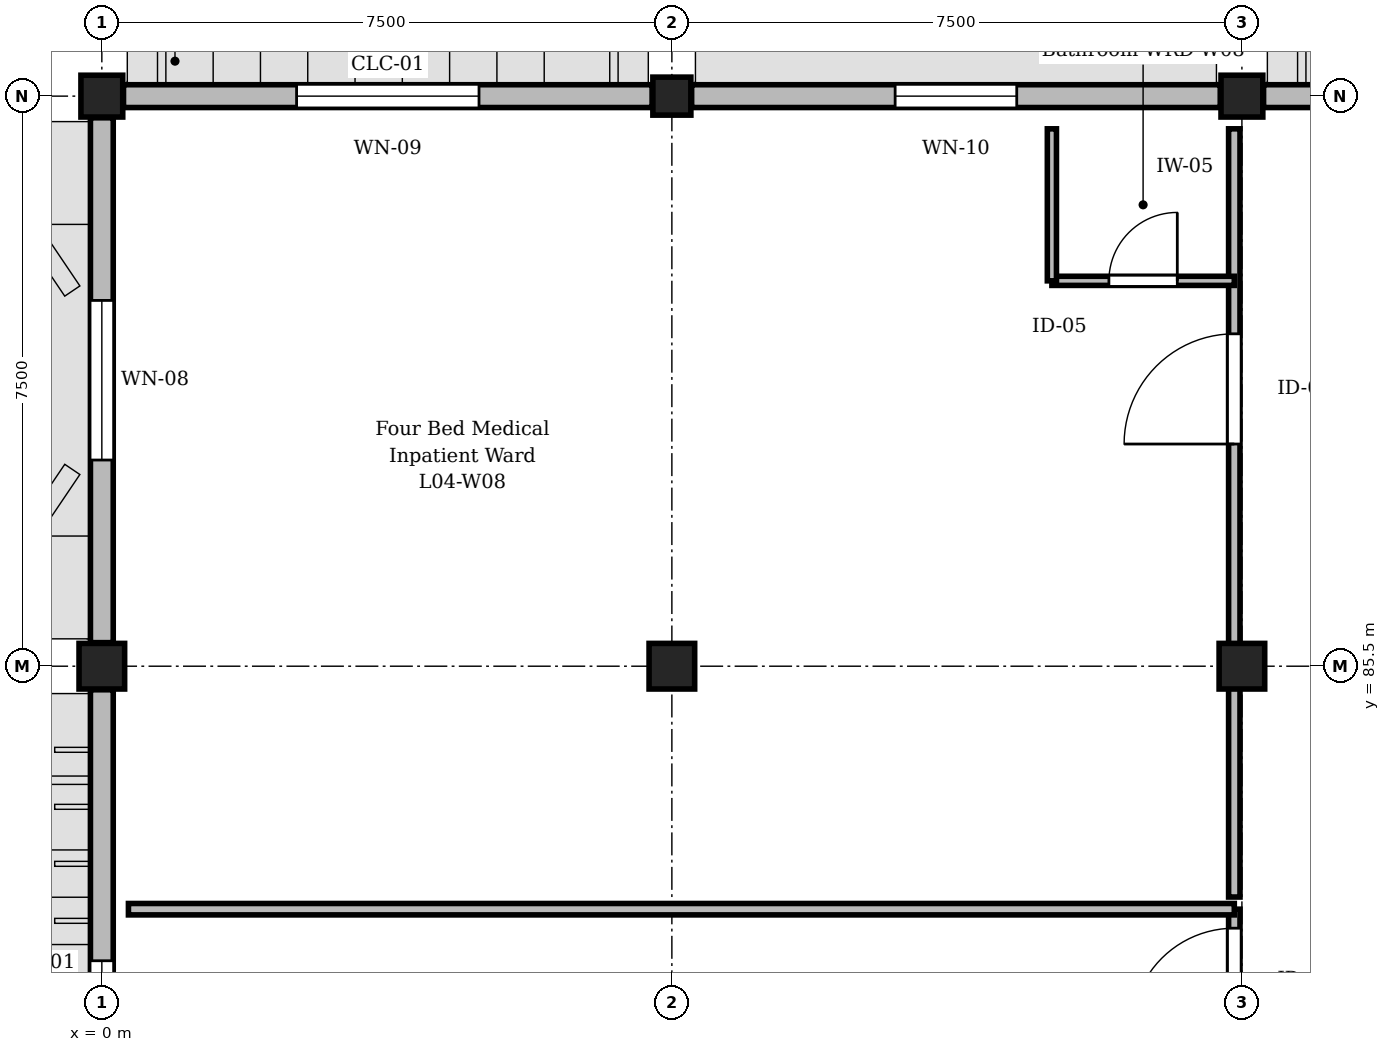
"""IFC4 building model, lengths in metres.
Left out: names, types, materials, properties, quantities, classifications, styles, units other than length and angle.
Written with IfcOpenShell. Run it as: python <this file> out.ifc"""

import sys

from ifc_helpers import new_model, si_unit, direction, frame, frame_2d, origin, origin_2d, place, context, subcontext, project, spatial, rectangle, circle, extrude, element, fill, save


model = new_model("IFC4")
c1 = context("Model", 3, precision=1e-05, world=origin(), true_north=direction((0.0, 1.0)))
c2 = subcontext(c1, "Body", "Model", "MODEL_VIEW")
j1 = project(units=[si_unit("LENGTHUNIT", "METRE"), si_unit("PLANEANGLEUNIT", "RADIAN")], contexts=[c1])
p1 = place(None, origin())
s1 = spatial("IfcSite", under=j1, at=p1, CompositionType="ELEMENT")
p2 = place(p1, origin())
s2 = spatial("IfcBuilding", under=s1, at=p2, CompositionType="ELEMENT")
p3 = place(p2, frame((0.0, 0.0, 17.85)))
s3 = spatial("IfcBuildingStorey", under=s2, at=p3, CompositionType="ELEMENT", Elevation=17.85)
p4 = place(p3, frame((0.0, 85.5, 0.0), z_axis=(0.0, 0.0, 1.0), x_axis=(1.0, 0.0, 0.0)))
e1 = element("IfcColumn", 1, at=p4, inside=s3, PredefinedType="COLUMN", context=c2, shape_type="SweptSolid", body=[
    extrude(rectangle(XDim=0.6, YDim=0.6, at=origin_2d()), origin(), (0.0, 0.0, 1.0), 4.05),
])
p5 = place(p3, frame((0.0, 93.0, 0.0), z_axis=(0.0, 0.0, 1.0), x_axis=(1.0, 0.0, 0.0)))
e2 = element("IfcColumn", 2, at=p5, inside=s3, PredefinedType="COLUMN", context=c2, shape_type="SweptSolid", body=[
    extrude(rectangle(XDim=0.55, YDim=0.55, at=origin_2d()), origin(), (0.0, 0.0, 1.0), 4.05),
])
p6 = place(p3, frame((7.5, 85.5, 0.0), z_axis=(0.0, 0.0, 1.0), x_axis=(1.0, 0.0, 0.0)))
e3 = element("IfcColumn", 3, at=p6, inside=s3, PredefinedType="COLUMN", context=c2, shape_type="SweptSolid", body=[
    extrude(circle(Radius=0.3, at=origin_2d()), origin(), (0.0, 0.0, 1.0), 4.05),
])
p7 = place(p3, frame((7.5, 93.0, 0.0), z_axis=(0.0, 0.0, 1.0), x_axis=(1.0, 0.0, 0.0)))
e4 = element("IfcColumn", 4, at=p7, inside=s3, PredefinedType="COLUMN", context=c2, shape_type="SweptSolid", body=[
    extrude(rectangle(XDim=0.5, YDim=0.5, at=origin_2d()), origin(), (0.0, 0.0, 1.0), 4.05),
])
p8 = place(p3, frame((15.0, 85.5, 0.0), z_axis=(0.0, 0.0, 1.0), x_axis=(1.0, 0.0, 0.0)))
e5 = element("IfcColumn", 5, at=p8, inside=s3, PredefinedType="COLUMN", context=c2, shape_type="SweptSolid", body=[
    extrude(rectangle(XDim=0.6, YDim=0.6, at=origin_2d()), origin(), (0.0, 0.0, 1.0), 4.05),
])
p9 = place(p3, frame((15.0, 93.0, 0.0), z_axis=(0.0, 0.0, 1.0), x_axis=(1.0, 0.0, 0.0)))
e6 = element("IfcColumn", 6, at=p9, inside=s3, PredefinedType="COLUMN", context=c2, shape_type="SweptSolid", body=[
    extrude(rectangle(XDim=0.55, YDim=0.55, at=origin_2d()), origin(), (0.0, 0.0, 1.0), 4.05),
])
p10 = place(p3, frame((0.0, 76.86, 0.0), z_axis=(0.0, 0.0, 1.0), x_axis=(0.0, 1.0, 0.0)))
e7 = element("IfcWall", 7, at=p10, inside=s3, PredefinedType="STANDARD", context=c2, shape_type="SweptSolid", body=[
    extrude(rectangle(XDim=8.33, YDim=0.3, at=frame_2d((4.165, 0.0))), origin(), (0.0, 0.0, 1.0), 3.22),
])
p11 = place(p10, frame((3.565, 0.0, 0.9)))
e8 = element("IfcOpeningElement", 8, at=p11, cuts=e7, PredefinedType="OPENING", context=c2, shape_type="SweptSolid", body=[
    extrude(rectangle(XDim=1.2, YDim=2.04, at=frame_2d((0.6, 1.02))), frame((0.0, 0.16, 0.0), z_axis=(0.0, -1.0, 0.0), x_axis=(1.0, 0.0, 0.0)), (0.0, 0.0, 1.0), 0.32),
])
p12 = place(p3, frame((0.285, 93.0, 0.0), z_axis=(0.0, 0.0, 1.0), x_axis=(1.0, 0.0, 0.0)))
e9 = element("IfcWall", 9, at=p12, inside=s3, PredefinedType="STANDARD", context=c2, shape_type="SweptSolid", body=[
    extrude(rectangle(XDim=6.955, YDim=0.3, at=frame_2d((3.478, 0.0))), origin(), (0.0, 0.0, 1.0), 3.17),
])
p13 = place(p12, frame((2.278, 0.0, 0.9)))
e10 = element("IfcOpeningElement", 10, at=p13, cuts=e9, PredefinedType="OPENING", context=c2, shape_type="SweptSolid", body=[
    extrude(rectangle(XDim=2.4, YDim=1.99, at=frame_2d((1.2, 0.995))), frame((0.0, 0.16, 0.0), z_axis=(0.0, -1.0, 0.0), x_axis=(1.0, 0.0, 0.0)), (0.0, 0.0, 1.0), 0.32),
])
p14 = place(p3, frame((0.0, 85.81, 0.0), z_axis=(0.0, 0.0, 1.0), x_axis=(0.0, 1.0, 0.0)))
e11 = element("IfcWall", 11, at=p14, inside=s3, PredefinedType="STANDARD", context=c2, shape_type="SweptSolid", body=[
    extrude(rectangle(XDim=6.905, YDim=0.3, at=frame_2d((3.453, 0.0))), origin(), (0.0, 0.0, 1.0), 3.17),
])
p15 = place(p14, frame((2.403, 0.0, 0.9)))
e12 = element("IfcOpeningElement", 12, at=p15, cuts=e11, PredefinedType="OPENING", context=c2, shape_type="SweptSolid", body=[
    extrude(rectangle(XDim=2.1, YDim=1.99, at=frame_2d((1.05, 0.995))), frame((0.0, 0.16, 0.0), z_axis=(0.0, -1.0, 0.0), x_axis=(1.0, 0.0, 0.0)), (0.0, 0.0, 1.0), 0.32),
])
p16 = place(p3, frame((7.76, 93.0, 0.0), z_axis=(0.0, 0.0, 1.0), x_axis=(1.0, 0.0, 0.0)))
e13 = element("IfcWall", 13, at=p16, inside=s3, PredefinedType="STANDARD", context=c2, shape_type="SweptSolid", body=[
    extrude(rectangle(XDim=6.955, YDim=0.3, at=frame_2d((3.478, 0.0))), origin(), (0.0, 0.0, 1.0), 3.17),
])
p17 = place(p16, frame((2.677, 0.0, 0.9)))
e14 = element("IfcOpeningElement", 14, at=p17, cuts=e13, PredefinedType="OPENING", context=c2, shape_type="SweptSolid", body=[
    extrude(rectangle(XDim=1.6, YDim=1.95, at=frame_2d((0.8, 0.975))), frame((0.0, 0.16, 0.0), z_axis=(0.0, -1.0, 0.0), x_axis=(1.0, 0.0, 0.0)), (0.0, 0.0, 1.0), 0.32),
])
p18 = place(p3, frame((15.285, 93.0, 0.0), z_axis=(0.0, 0.0, 1.0), x_axis=(1.0, 0.0, 0.0)))
e15 = element("IfcWall", 15, at=p18, inside=s3, PredefinedType="STANDARD", context=c2, shape_type="SweptSolid", body=[
    extrude(rectangle(XDim=6.955, YDim=0.3, at=frame_2d((3.478, 0.0))), origin(), (0.0, 0.0, 1.0), 3.17),
])
p19 = place(p18, frame((2.577, 0.0, 0.9)))
e16 = element("IfcOpeningElement", 16, at=p19, cuts=e15, PredefinedType="OPENING", context=c2, shape_type="SweptSolid", body=[
    extrude(rectangle(XDim=1.8, YDim=1.95, at=frame_2d((0.9, 0.975))), frame((0.0, 0.16, 0.0), z_axis=(0.0, -1.0, 0.0), x_axis=(1.0, 0.0, 0.0)), (0.0, 0.0, 1.0), 0.32),
])
p20 = place(p3, frame((14.9, 72.197, 0.0), z_axis=(0.0, 0.0, 1.0), x_axis=(0.0, 1.0, 0.0)))
e17 = element("IfcWall", 17, at=p20, inside=s3, PredefinedType="PARTITIONING", context=c2, shape_type="SweptSolid", body=[
    extrude(rectangle(XDim=10.106, YDim=0.15, at=frame_2d((5.053, 0.0))), origin(), (0.0, 0.0, 1.0), 3.055),
])
p21 = place(p20, frame((8.507, 0.0, 0.0)))
e18 = element("IfcOpeningElement", 18, at=p21, cuts=e17, PredefinedType="OPENING", context=c2, shape_type="SweptSolid", body=[
    extrude(rectangle(XDim=1.35, YDim=2.25, at=frame_2d((0.675, 1.125))), frame((0.0, 0.085, 0.0), z_axis=(0.0, -1.0, 0.0), x_axis=(1.0, 0.0, 0.0)), (0.0, 0.0, 1.0), 0.17),
])
p22 = place(p3, frame((14.9, 82.463, 0.0), z_axis=(0.0, 0.0, 1.0), x_axis=(0.0, 1.0, 0.0)))
e19 = element("IfcWall", 19, at=p22, inside=s3, PredefinedType="PARTITIONING", context=c2, shape_type="SweptSolid", body=[
    extrude(rectangle(XDim=10.107, YDim=0.15, at=frame_2d((5.053, 0.0))), origin(), (0.0, 0.0, 1.0), 3.055),
])
p23 = place(p22, frame((5.96, 0.0, 0.0)))
e20 = element("IfcOpeningElement", 20, at=p23, cuts=e19, PredefinedType="OPENING", context=c2, shape_type="SweptSolid", body=[
    extrude(rectangle(XDim=1.45, YDim=2.3, at=frame_2d((0.725, 1.15))), frame((0.0, 0.085, 0.0), z_axis=(0.0, -1.0, 0.0), x_axis=(1.0, 0.0, 0.0)), (0.0, 0.0, 1.0), 0.17),
])
p24 = place(p3, frame((12.5, 90.57, 0.0), z_axis=(0.0, 0.0, 1.0), x_axis=(1.0, 0.0, 0.0)))
e21 = element("IfcWall", 21, at=p24, inside=s3, PredefinedType="PARTITIONING", context=c2, shape_type="SweptSolid", body=[
    extrude(rectangle(XDim=2.4, YDim=0.12, at=frame_2d((1.2, 0.0))), origin(), (0.0, 0.0, 1.0), 3.755),
])
p25 = place(p24, frame((0.75, 0.0, 0.0)))
e22 = element("IfcOpeningElement", 22, at=p25, cuts=e21, PredefinedType="OPENING", context=c2, shape_type="SweptSolid", body=[
    extrude(rectangle(XDim=0.9, YDim=2.1, at=frame_2d((0.45, 1.05))), frame((0.0, 0.07, 0.0), z_axis=(0.0, -1.0, 0.0), x_axis=(1.0, 0.0, 0.0)), (0.0, 0.0, 1.0), 0.14),
])
p26 = place(p3, frame((12.5, 90.57, 0.0), z_axis=(0.0, 0.0, 1.0), x_axis=(0.0, 1.0, 0.0)))
e23 = element("IfcWall", 23, at=p26, inside=s3, PredefinedType="PARTITIONING", context=c2, shape_type="SweptSolid", body=[
    extrude(rectangle(XDim=2.0, YDim=0.12, at=frame_2d((1.0, 0.0))), origin(), (0.0, 0.0, 1.0), 3.755),
])
p27 = place(p3, frame((0.35, 82.303, 0.0), z_axis=(0.0, 0.0, 1.0), x_axis=(1.0, 0.0, 0.0)))
e24 = element("IfcWall", 24, at=p27, inside=s3, PredefinedType="PARTITIONING", context=c2, shape_type="SweptSolid", body=[
    extrude(rectangle(XDim=14.55, YDim=0.15, at=frame_2d((7.275, 0.0))), origin(), (0.0, 0.0, 1.0), 3.755),
])
p28 = place(p11, origin())
e25 = element("IfcWindow", 25, at=p28, inside=s3, PartitioningType="SINGLE_PANEL", PredefinedType="WINDOW", context=c2, shape_type="SweptSolid", body=[
    extrude(rectangle(XDim=1.2, YDim=2.04, at=frame_2d((0.6, 1.02))), frame((0.0, 0.03, 0.0), z_axis=(0.0, -1.0, 0.0), x_axis=(1.0, 0.0, 0.0)), (0.0, 0.0, 1.0), 0.06),
])
fill(e8, e25)
p29 = place(p13, origin())
e26 = element("IfcWindow", 26, at=p29, inside=s3, PartitioningType="SINGLE_PANEL", PredefinedType="WINDOW", context=c2, shape_type="SweptSolid", body=[
    extrude(rectangle(XDim=2.4, YDim=1.99, at=frame_2d((1.2, 0.995))), frame((0.0, 0.03, 0.0), z_axis=(0.0, -1.0, 0.0), x_axis=(1.0, 0.0, 0.0)), (0.0, 0.0, 1.0), 0.06),
])
fill(e10, e26)
p30 = place(p15, origin())
e27 = element("IfcWindow", 27, at=p30, inside=s3, PartitioningType="SINGLE_PANEL", PredefinedType="WINDOW", context=c2, shape_type="SweptSolid", body=[
    extrude(rectangle(XDim=2.1, YDim=1.99, at=frame_2d((1.05, 0.995))), frame((0.0, 0.03, 0.0), z_axis=(0.0, -1.0, 0.0), x_axis=(1.0, 0.0, 0.0)), (0.0, 0.0, 1.0), 0.06),
])
fill(e12, e27)
p31 = place(p17, origin())
e28 = element("IfcWindow", 28, at=p31, inside=s3, PartitioningType="SINGLE_PANEL", PredefinedType="WINDOW", context=c2, shape_type="SweptSolid", body=[
    extrude(rectangle(XDim=1.6, YDim=1.95, at=frame_2d((0.8, 0.975))), frame((0.0, 0.03, 0.0), z_axis=(0.0, -1.0, 0.0), x_axis=(1.0, 0.0, 0.0)), (0.0, 0.0, 1.0), 0.06),
])
fill(e14, e28)
p32 = place(p21, origin())
e29 = element("IfcDoor", 29, at=p32, inside=s3, OperationType="SINGLE_SWING_LEFT", PredefinedType="DOOR", context=c2, shape_type="SweptSolid", body=[
    extrude(rectangle(XDim=1.35, YDim=2.25, at=frame_2d((0.675, 1.125))), frame((0.0, 0.025, 0.0), z_axis=(0.0, -1.0, 0.0), x_axis=(1.0, 0.0, 0.0)), (0.0, 0.0, 1.0), 0.05),
])
fill(e18, e29)
p33 = place(p23, origin())
e30 = element("IfcDoor", 30, at=p33, inside=s3, OperationType="SINGLE_SWING_LEFT", PredefinedType="DOOR", context=c2, shape_type="SweptSolid", body=[
    extrude(rectangle(XDim=1.45, YDim=2.3, at=frame_2d((0.725, 1.15))), frame((0.0, 0.025, 0.0), z_axis=(0.0, -1.0, 0.0), x_axis=(1.0, 0.0, 0.0)), (0.0, 0.0, 1.0), 0.05),
])
fill(e20, e30)
p34 = place(p25, origin())
e31 = element("IfcDoor", 31, at=p34, inside=s3, OperationType="SINGLE_SWING_RIGHT", PredefinedType="DOOR", context=c2, shape_type="SweptSolid", body=[
    extrude(rectangle(XDim=0.9, YDim=2.1, at=frame_2d((0.45, 1.05))), frame((0.0, 0.025, 0.0), z_axis=(0.0, -1.0, 0.0), x_axis=(1.0, 0.0, 0.0)), (0.0, 0.0, 1.0), 0.05),
])
fill(e22, e31)
save(model, sys.argv[1])
